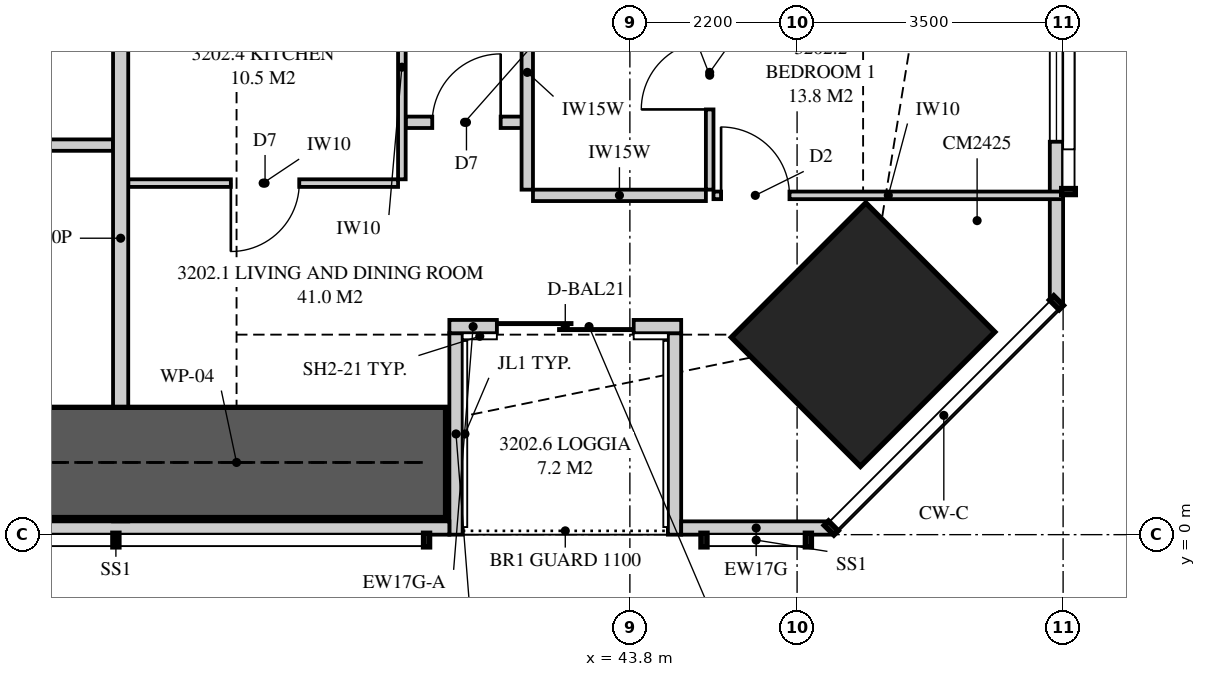
"""IFC4 building model, lengths in metres.
Left out: names, types, materials, properties, quantities, classifications, styles, units other than length and angle.
Written with IfcOpenShell. Run it as: python <this file> out.ifc"""

import sys

from ifc_helpers import new_model, si_unit, direction, frame, frame_2d, origin, origin_2d, place, context, subcontext, project, spatial, polyline, rectangle, outline, extrude, element, fill, save


model = new_model("IFC4")
c1 = context("Model", 3, precision=1e-05, world=origin(), true_north=direction((0.0, 1.0)))
c2 = subcontext(c1, "Body", "Model", "MODEL_VIEW")
j1 = project(units=[si_unit("LENGTHUNIT", "METRE"), si_unit("PLANEANGLEUNIT", "RADIAN")], contexts=[c1])
p1 = place(None, origin())
s1 = spatial("IfcSite", under=j1, at=p1, CompositionType="ELEMENT")
p2 = place(p1, origin())
s2 = spatial("IfcBuilding", under=s1, at=p2, CompositionType="ELEMENT")
p3 = place(p2, frame((0.0, 0.0, 118.25)))
s3 = spatial("IfcBuildingStorey", under=s2, at=p3, CompositionType="ELEMENT", Elevation=118.25)
p4 = place(p3, frame((46.869, 2.631, 0.0), z_axis=(0.0, 0.0, 1.0), x_axis=(-0.707106781187, 0.707106781187, 0.0)))
e1 = element("IfcColumn", 1, at=p4, inside=s3, PredefinedType="COLUMN", context=c2, shape_type="SweptSolid", body=[
    extrude(rectangle(XDim=2.4, YDim=2.5, at=origin_2d()), origin(), (0.0, 0.0, 1.0), 3.35),
])
p5 = place(p3, frame((14.051, 0.087, 0.0), z_axis=(0.0, 0.0, 1.0), x_axis=(1.0, 0.0, 0.0)))
e2 = element("IfcWall", 2, at=p5, inside=s3, PredefinedType="SOLIDWALL", context=c2, shape_type="SweptSolid", body=[
    extrude(outline(polyline([(0.0, 0.0), (27.374, 0.0), (27.374, 3.11), (24.777, 3.11), (24.777, 2.15), (24.732, 2.15), (24.732, 3.11), (24.574, 3.11), (24.574, 2.15), (2.824, 2.15), (2.824, 3.11), (2.666, 3.11), (2.666, 2.15), (2.62, 2.15), (2.62, 3.11), (0.0, 3.11), (0.0, 0.0)])), frame((0.0, 0.087, 0.0), z_axis=(0.0, -1.0, 0.0), x_axis=(1.0, 0.0, 0.0)), (0.0, 0.0, 1.0), 0.175),
])
p6 = place(p5, frame((5.874, 0.0, 0.4)))
e3 = element("IfcOpeningElement", 3, at=p6, cuts=e2, PredefinedType="OPENING", context=c2, shape_type="SweptSolid", body=[
    extrude(rectangle(XDim=1.8, YDim=1.7, at=frame_2d((0.9, 0.85))), frame((0.0, 0.097, 0.0), z_axis=(0.0, -1.0, 0.0), x_axis=(1.0, 0.0, 0.0)), (0.0, 0.0, 1.0), 0.195),
])
p7 = place(p5, frame((9.04, 0.0, 0.4)))
e4 = element("IfcOpeningElement", 4, at=p7, cuts=e2, PredefinedType="OPENING", context=c2, shape_type="SweptSolid", body=[
    extrude(rectangle(XDim=1.8, YDim=1.7, at=frame_2d((0.9, 0.85))), frame((0.0, 0.097, 0.0), z_axis=(0.0, -1.0, 0.0), x_axis=(1.0, 0.0, 0.0)), (0.0, 0.0, 1.0), 0.195),
])
p8 = place(p5, frame((16.564, 0.0, 0.4)))
e5 = element("IfcOpeningElement", 5, at=p8, cuts=e2, PredefinedType="OPENING", context=c2, shape_type="SweptSolid", body=[
    extrude(rectangle(XDim=1.8, YDim=1.7, at=frame_2d((0.9, 0.85))), frame((0.0, 0.097, 0.0), z_axis=(0.0, -1.0, 0.0), x_axis=(1.0, 0.0, 0.0)), (0.0, 0.0, 1.0), 0.195),
])
p9 = place(p5, frame((19.889, 0.0, 0.4)))
e6 = element("IfcOpeningElement", 6, at=p9, cuts=e2, PredefinedType="OPENING", context=c2, shape_type="SweptSolid", body=[
    extrude(rectangle(XDim=1.8, YDim=1.7, at=frame_2d((0.9, 0.85))), frame((0.0, 0.097, 0.0), z_axis=(0.0, -1.0, 0.0), x_axis=(1.0, 0.0, 0.0)), (0.0, 0.0, 1.0), 0.195),
])
p10 = place(p3, frame((44.475, 0.087, 0.0), z_axis=(0.0, 0.0, 1.0), x_axis=(1.0, 0.0, 0.0)))
e7 = element("IfcWall", 7, at=p10, inside=s3, PredefinedType="SOLIDWALL", context=c2, shape_type="SweptSolid", body=[
    extrude(rectangle(XDim=1.974, YDim=0.175, at=frame_2d((0.987, 0.0))), origin(), (0.0, 0.0, 1.0), 3.11),
])
p11 = place(p3, frame((41.425, 2.738, 0.0), z_axis=(0.0, 0.0, 1.0), x_axis=(1.0, 0.0, 0.0)))
e8 = element("IfcWall", 8, at=p11, inside=s3, PredefinedType="SOLIDWALL", context=c2, shape_type="SweptSolid", body=[
    extrude(rectangle(XDim=0.625, YDim=0.175, at=frame_2d((0.312, 0.0))), origin(), (0.0, 0.0, 1.0), 2.51),
])
p12 = place(p3, frame((42.05, 2.738, 0.0), z_axis=(0.0, 0.0, 1.0), x_axis=(1.0, 0.0, 0.0)))
e9 = element("IfcWall", 9, at=p12, inside=s3, PredefinedType="SOLIDWALL", context=c2, shape_type="SweptSolid", body=[
    extrude(rectangle(XDim=2.425, YDim=0.175, at=frame_2d((1.212, 0.0))), origin(), (0.0, 0.0, 1.0), 2.15),
])
p13 = place(p12, origin())
e10 = element("IfcOpeningElement", 10, at=p13, cuts=e9, PredefinedType="OPENING", context=c2, shape_type="SweptSolid", body=[
    extrude(rectangle(XDim=1.8, YDim=2.1, at=frame_2d((0.9, 1.05))), frame((0.0, 0.097, 0.0), z_axis=(0.0, -1.0, 0.0), x_axis=(1.0, 0.0, 0.0)), (0.0, 0.0, 1.0), 0.195),
])
p14 = place(p3, frame((41.512, 0.0, 0.0), z_axis=(0.0, 0.0, 1.0), x_axis=(0.0, 1.0, 0.0)))
e11 = element("IfcWall", 11, at=p14, inside=s3, PredefinedType="SOLIDWALL", context=c2, shape_type="SweptSolid", body=[
    extrude(outline(polyline([(0.0, 0.0), (2.65, 0.0), (2.65, 2.51), (2.373, 2.51), (2.373, 2.15), (0.705, 2.15), (0.705, 3.11), (0.0, 3.11), (0.0, 0.0)])), frame((0.0, 0.087, 0.0), z_axis=(0.0, -1.0, 0.0), x_axis=(1.0, 0.0, 0.0)), (0.0, 0.0, 1.0), 0.175),
])
p15 = place(p3, frame((44.387, 0.0, 0.0), z_axis=(0.0, 0.0, 1.0), x_axis=(0.0, 1.0, 0.0)))
e12 = element("IfcWall", 12, at=p15, inside=s3, PredefinedType="SOLIDWALL", context=c2, shape_type="SweptSolid", body=[
    extrude(outline(polyline([(0.0, 0.0), (2.65, 0.0), (2.65, 2.15), (1.291, 2.15), (1.291, 3.11), (0.0, 3.11), (0.0, 0.0)])), frame((0.0, 0.087, 0.0), z_axis=(0.0, -1.0, 0.0), x_axis=(1.0, 0.0, 0.0)), (0.0, 0.0, 1.0), 0.175),
])
p16 = place(p3, frame((49.413, 3.051, 0.0), z_axis=(0.0, 0.0, 1.0), x_axis=(0.0, 1.0, 0.0)))
e13 = element("IfcWall", 13, at=p16, inside=s3, PredefinedType="SOLIDWALL", context=c2, shape_type="SweptSolid", body=[
    extrude(outline(polyline([(0.0, 0.0), (31.897, 0.0), (31.897, 3.11), (22.167, 3.11), (22.167, 2.15), (22.074, 2.15), (22.074, 3.11), (21.949, 3.11), (21.949, 2.15), (9.949, 2.15), (9.949, 3.11), (9.823, 3.11), (9.823, 2.15), (9.73, 2.15), (9.73, 3.11), (0.0, 3.11), (0.0, 0.0)])), frame((0.0, 0.087, 0.0), z_axis=(0.0, -1.0, 0.0), x_axis=(1.0, 0.0, 0.0)), (0.0, 0.0, 1.0), 0.175),
])
p17 = place(p16, frame((2.118, 0.0, 0.4)))
e14 = element("IfcOpeningElement", 14, at=p17, cuts=e13, PredefinedType="OPENING", context=c2, shape_type="SweptSolid", body=[
    extrude(rectangle(XDim=1.8, YDim=1.7, at=frame_2d((0.9, 0.85))), frame((0.0, 0.097, 0.0), z_axis=(0.0, -1.0, 0.0), x_axis=(1.0, 0.0, 0.0)), (0.0, 0.0, 1.0), 0.195),
])
p18 = place(p16, frame((14.849, 0.0, 0.4)))
e15 = element("IfcOpeningElement", 15, at=p18, cuts=e13, PredefinedType="OPENING", context=c2, shape_type="SweptSolid", body=[
    extrude(rectangle(XDim=1.2, YDim=1.7, at=frame_2d((0.6, 0.85))), frame((0.0, 0.097, 0.0), z_axis=(0.0, -1.0, 0.0), x_axis=(1.0, 0.0, 0.0)), (0.0, 0.0, 1.0), 0.195),
])
p19 = place(p16, frame((27.479, 0.0, 0.4)))
e16 = element("IfcOpeningElement", 16, at=p19, cuts=e13, PredefinedType="OPENING", context=c2, shape_type="SweptSolid", body=[
    extrude(rectangle(XDim=1.8, YDim=1.7, at=frame_2d((0.9, 0.85))), frame((0.0, 0.097, 0.0), z_axis=(0.0, -1.0, 0.0), x_axis=(1.0, 0.0, 0.0)), (0.0, 0.0, 1.0), 0.195),
])
p20 = place(p3, frame((37.1, 0.175, 0.0), z_axis=(0.0, 0.0, 1.0), x_axis=(0.0, 1.0, 0.0)))
e17 = element("IfcWall", 17, at=p20, inside=s3, PredefinedType="PARTITIONING", context=c2, shape_type="SweptSolid", body=[
    extrude(outline(polyline([(0.529, 2.15), (0.0, 2.15), (0.0, 0.0), (0.529, 0.0), (0.529, 0.461), (1.021, 0.461), (1.021, 0.0), (7.45, 0.0), (7.45, 3.11), (1.685, 3.11), (1.685, 2.15), (1.021, 2.15), (1.021, 1.688), (0.529, 1.688), (0.529, 2.15)])), frame((0.0, 0.1, 0.0), z_axis=(0.0, -1.0, 0.0), x_axis=(1.0, 0.0, 0.0)), (0.0, 0.0, 1.0), 0.2),
])
p21 = place(p3, frame((32.95, 5.125, 0.0), z_axis=(0.0, 0.0, 1.0), x_axis=(1.0, 0.0, 0.0)))
e18 = element("IfcWall", 18, at=p21, inside=s3, PredefinedType="PLUMBINGWALL", context=c2, shape_type="SweptSolid", body=[
    extrude(rectangle(XDim=4.05, YDim=0.15, at=frame_2d((2.025, 0.0))), origin(), (0.0, 0.0, 1.0), 3.11),
])
p22 = place(p21, frame((0.4, 0.0, 0.0)))
e19 = element("IfcOpeningElement", 19, at=p22, cuts=e18, PredefinedType="OPENING", context=c2, shape_type="SweptSolid", body=[
    extrude(rectangle(XDim=0.9, YDim=2.1, at=frame_2d((0.45, 1.05))), frame((0.0, 0.085, 0.0), z_axis=(0.0, -1.0, 0.0), x_axis=(1.0, 0.0, 0.0)), (0.0, 0.0, 1.0), 0.17),
])
p23 = place(p3, frame((44.85, 4.539, 0.0), z_axis=(0.0, 0.0, 1.0), x_axis=(0.0, 1.0, 0.0)))
e20 = element("IfcWall", 20, at=p23, inside=s3, PredefinedType="PARTITIONING", context=c2, shape_type="SweptSolid", body=[
    extrude(rectangle(XDim=3.086, YDim=0.1, at=frame_2d((1.543, 0.0))), origin(), (0.0, 0.0, 1.0), 3.11),
])
p24 = place(p23, frame((1.056, 0.0, 0.0)))
e21 = element("IfcOpeningElement", 21, at=p24, cuts=e20, PredefinedType="OPENING", context=c2, shape_type="SweptSolid", body=[
    extrude(rectangle(XDim=0.9, YDim=2.1, at=frame_2d((0.45, 1.05))), frame((0.0, 0.06, 0.0), z_axis=(0.0, -1.0, 0.0), x_axis=(1.0, 0.0, 0.0)), (0.0, 0.0, 1.0), 0.12),
])
p25 = place(p3, frame((44.9, 4.464, 0.0), z_axis=(0.0, 0.0, 1.0), x_axis=(1.0, 0.0, 0.0)))
e22 = element("IfcWall", 22, at=p25, inside=s3, PredefinedType="PARTITIONING", context=c2, shape_type="SweptSolid", body=[
    extrude(outline(polyline([(0.0, 0.0), (4.6, 0.0), (4.6, 3.11), (3.137, 3.11), (3.137, 2.15), (1.395, 2.15), (1.395, 3.11), (0.0, 3.11), (0.0, 0.0)])), frame((0.0, 0.05, 0.0), z_axis=(0.0, -1.0, 0.0), x_axis=(1.0, 0.0, 0.0)), (0.0, 0.0, 1.0), 0.1),
])
p26 = place(p25, frame((0.1, 0.0, 0.0)))
e23 = element("IfcOpeningElement", 23, at=p26, cuts=e22, PredefinedType="OPENING", context=c2, shape_type="SweptSolid", body=[
    extrude(rectangle(XDim=0.9, YDim=2.1, at=frame_2d((0.45, 1.05))), frame((0.0, 0.06, 0.0), z_axis=(0.0, -1.0, 0.0), x_axis=(1.0, 0.0, 0.0)), (0.0, 0.0, 1.0), 0.12),
])
p27 = place(p3, frame((42.525, 4.464, 0.0), z_axis=(0.0, 0.0, 1.0), x_axis=(1.0, 0.0, 0.0)))
e24 = element("IfcWall", 24, at=p27, inside=s3, PredefinedType="PLUMBINGWALL", context=c2, shape_type="SweptSolid", body=[
    extrude(rectangle(XDim=2.275, YDim=0.15, at=frame_2d((1.138, 0.0))), origin(), (0.0, 0.0, 1.0), 3.11),
])
p28 = place(p3, frame((42.45, 4.539, 0.0), z_axis=(0.0, 0.0, 1.0), x_axis=(0.0, 1.0, 0.0)))
e25 = element("IfcWall", 25, at=p28, inside=s3, PredefinedType="PLUMBINGWALL", context=c2, shape_type="SweptSolid", body=[
    extrude(rectangle(XDim=3.086, YDim=0.15, at=frame_2d((1.543, 0.0))), origin(), (0.0, 0.0, 1.0), 3.11),
])
p29 = place(p3, frame((37.2, 4.625, 0.0), z_axis=(0.0, 0.0, 1.0), x_axis=(1.0, 0.0, 0.0)))
e26 = element("IfcWall", 26, at=p29, inside=s3, PredefinedType="PARTITIONING", context=c2, shape_type="SweptSolid", body=[
    extrude(outline(polyline([(0.0, 0.0), (3.55, 0.0), (3.55, 3.11), (1.712, 3.11), (1.712, 2.541), (1.138, 2.541), (1.138, 3.11), (0.0, 3.11), (0.0, 0.0)])), frame((0.0, 0.05, 0.0), z_axis=(0.0, -1.0, 0.0), x_axis=(1.0, 0.0, 0.0)), (0.0, 0.0, 1.0), 0.1),
])
p30 = place(p29, frame((1.35, 0.0, 0.0)))
e27 = element("IfcOpeningElement", 27, at=p30, cuts=e26, PredefinedType="OPENING", context=c2, shape_type="SweptSolid", body=[
    extrude(rectangle(XDim=0.9, YDim=2.1, at=frame_2d((0.45, 1.05))), frame((0.0, 0.06, 0.0), z_axis=(0.0, -1.0, 0.0), x_axis=(1.0, 0.0, 0.0)), (0.0, 0.0, 1.0), 0.12),
])
p31 = place(p3, frame((40.8, 4.675, 0.0), z_axis=(0.0, 0.0, 1.0), x_axis=(0.0, 1.0, 0.0)))
e28 = element("IfcWall", 28, at=p31, inside=s3, PredefinedType="PARTITIONING", context=c2, shape_type="SweptSolid", body=[
    extrude(rectangle(XDim=2.95, YDim=0.1, at=frame_2d((1.475, 0.0))), origin(), (0.0, 0.0, 1.0), 3.11),
])
p32 = place(p3, frame((40.85, 5.425, 0.0), z_axis=(0.0, 0.0, 1.0), x_axis=(1.0, 0.0, 0.0)))
e29 = element("IfcWall", 29, at=p32, inside=s3, PredefinedType="PLUMBINGWALL", context=c2, shape_type="SweptSolid", body=[
    extrude(rectangle(XDim=1.55, YDim=0.15, at=frame_2d((0.775, 0.0))), origin(), (0.0, 0.0, 1.0), 3.11),
])
p33 = place(p32, frame((0.35, 0.0, 0.0)))
e30 = element("IfcOpeningElement", 30, at=p33, cuts=e29, PredefinedType="OPENING", context=c2, shape_type="SweptSolid", body=[
    extrude(rectangle(XDim=0.9, YDim=2.1, at=frame_2d((0.45, 1.05))), frame((0.0, 0.085, 0.0), z_axis=(0.0, -1.0, 0.0), x_axis=(1.0, 0.0, 0.0)), (0.0, 0.0, 1.0), 0.17),
])
p34 = place(p3, frame((35.875, 0.95, 0.0), z_axis=(0.0, 0.0, 1.0), x_axis=(1.0, 0.0, 0.0)))
e31 = element("IfcWall", 31, at=p34, inside=s3, PredefinedType="SHEAR", context=c2, shape_type="SweptSolid", body=[
    extrude(rectangle(XDim=5.5, YDim=1.45, at=frame_2d((2.75, 0.0))), origin(), (0.0, 0.0, 1.0), 3.35),
])
p35 = place(p13, origin())
e32 = element("IfcDoor", 32, at=p35, inside=s3, OperationType="SLIDING_TO_LEFT", PredefinedType="DOOR", context=c2, shape_type="SweptSolid", body=[
    extrude(rectangle(XDim=1.8, YDim=2.1, at=frame_2d((0.9, 1.05))), frame((0.0, 0.025, 0.0), z_axis=(0.0, -1.0, 0.0), x_axis=(1.0, 0.0, 0.0)), (0.0, 0.0, 1.0), 0.05),
])
fill(e10, e32)
p36 = place(p17, origin())
e33 = element("IfcWindow", 33, at=p36, inside=s3, PartitioningType="SINGLE_PANEL", PredefinedType="WINDOW", context=c2, shape_type="SweptSolid", body=[
    extrude(rectangle(XDim=1.8, YDim=1.7, at=frame_2d((0.9, 0.85))), frame((0.0, 0.03, 0.0), z_axis=(0.0, -1.0, 0.0), x_axis=(1.0, 0.0, 0.0)), (0.0, 0.0, 1.0), 0.06),
])
fill(e14, e33)
p37 = place(p26, origin())
e34 = element("IfcDoor", 34, at=p37, inside=s3, OperationType="SINGLE_SWING_LEFT", PredefinedType="DOOR", context=c2, shape_type="SweptSolid", body=[
    extrude(rectangle(XDim=0.9, YDim=2.1, at=frame_2d((0.45, 1.05))), frame((0.0, 0.025, 0.0), z_axis=(0.0, -1.0, 0.0), x_axis=(1.0, 0.0, 0.0)), (0.0, 0.0, 1.0), 0.05),
])
fill(e23, e34)
p38 = place(p24, origin())
e35 = element("IfcDoor", 35, at=p38, inside=s3, OperationType="SINGLE_SWING_LEFT", PredefinedType="DOOR", context=c2, shape_type="SweptSolid", body=[
    extrude(rectangle(XDim=0.9, YDim=2.1, at=frame_2d((0.45, 1.05))), frame((0.0, 0.025, 0.0), z_axis=(0.0, -1.0, 0.0), x_axis=(1.0, 0.0, 0.0)), (0.0, 0.0, 1.0), 0.05),
])
fill(e21, e35)
p39 = place(p30, frame((0.9, 0.0, 0.0), z_axis=(0.0, 0.0, 1.0), x_axis=(-1.0, 0.0, 0.0)))
e36 = element("IfcDoor", 36, at=p39, inside=s3, OperationType="SINGLE_SWING_RIGHT", PredefinedType="DOOR", context=c2, shape_type="SweptSolid", body=[
    extrude(rectangle(XDim=0.9, YDim=2.1, at=frame_2d((0.45, 1.05))), frame((0.0, 0.025, 0.0), z_axis=(0.0, -1.0, 0.0), x_axis=(1.0, 0.0, 0.0)), (0.0, 0.0, 1.0), 0.05),
])
fill(e27, e36)
p40 = place(p33, origin())
e37 = element("IfcDoor", 37, at=p40, inside=s3, OperationType="SINGLE_SWING_RIGHT", PredefinedType="DOOR", context=c2, shape_type="SweptSolid", body=[
    extrude(rectangle(XDim=0.9, YDim=2.1, at=frame_2d((0.45, 1.05))), frame((0.0, 0.025, 0.0), z_axis=(0.0, -1.0, 0.0), x_axis=(1.0, 0.0, 0.0)), (0.0, 0.0, 1.0), 0.05),
])
fill(e30, e37)
save(model, sys.argv[1])
